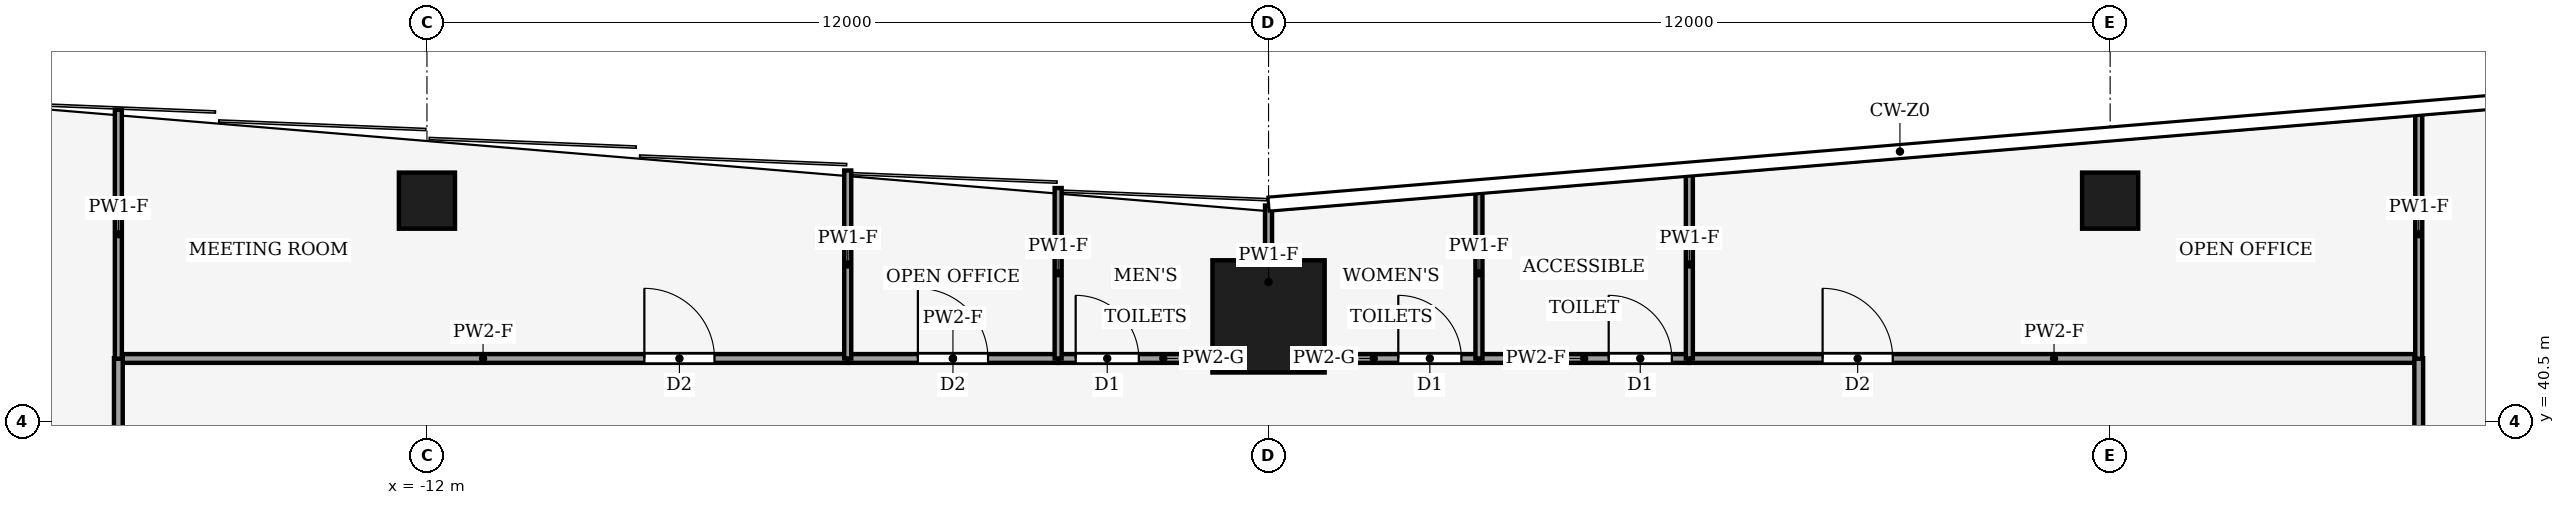
"""IFC4 building model, lengths in metres.
Left out: names, types, materials, properties, quantities, classifications, styles, units other than length and angle.
Written with IfcOpenShell. Run it as: python <this file> out.ifc"""

import sys

from ifc_helpers import new_model, si_unit, direction, frame, frame_2d, origin, origin_2d, place, context, subcontext, project, spatial, rectangle, hollow_rectangle, extrude, element, fill, save


model = new_model("IFC4")
c1 = context("Model", 3, precision=1e-05, world=origin(), true_north=direction((0.0, 1.0)))
c2 = subcontext(c1, "Body", "Model", "MODEL_VIEW")
j1 = project(units=[si_unit("LENGTHUNIT", "METRE"), si_unit("PLANEANGLEUNIT", "RADIAN")], contexts=[c1])
p1 = place(None, origin())
s1 = spatial("IfcSite", under=j1, at=p1, CompositionType="ELEMENT")
p2 = place(p1, origin())
s2 = spatial("IfcBuilding", under=s1, at=p2, CompositionType="ELEMENT")
p3 = place(p2, frame((0.0, 0.0, 42.0)))
s3 = spatial("IfcBuildingStorey", under=s2, at=p3, CompositionType="ELEMENT", Elevation=42.0)
p4 = place(p3, frame((0.0, 42.0, 0.0), z_axis=(0.0, 0.0, 1.0), x_axis=(1.0, 0.0, 0.0)))
e1 = element("IfcColumn", 1, at=p4, inside=s3, PredefinedType="COLUMN", context=c2, shape_type="SweptSolid", body=[
    extrude(hollow_rectangle(XDim=1.6, YDim=1.6, WallThickness=0.09, at=origin_2d()), origin(), (0.0, 0.0, 1.0), 4.0),
])
for number, where, z_axis, x_axis in (
    (2, (-12.0, 43.65, 0.0), (0.0, 0.0, 1.0), (1.0, 0.0, 0.0)),
    (3, (12.0, 43.65, 0.0), (0.0, 0.0, 1.0), (1.0, 0.0, 0.0)),
):
    element("IfcColumn", number, at=place(p3, frame(where, z_axis=z_axis, x_axis=x_axis)), inside=s3, PredefinedType="COLUMN", context=c2, shape_type="SweptSolid", body=[
        extrude(hollow_rectangle(XDim=0.8, YDim=0.8, WallThickness=0.04, at=origin_2d()), origin(), (0.0, 0.0, 1.0), 4.0),
    ])
p5 = place(p3, frame((-16.4, 41.4, 0.0), z_axis=(0.0, 0.0, 1.0), x_axis=(1.0, 0.0, 0.0)))
e4 = element("IfcWall", 4, at=p5, inside=s3, PredefinedType="PARTITIONING", context=c2, shape_type="SweptSolid", body=[
    extrude(rectangle(XDim=10.4, YDim=0.125, at=frame_2d((5.2, 0.0))), origin(), (0.0, 0.0, 1.0), 3.54),
])
p6 = place(p5, frame((7.5, 0.0, 0.0)))
e5 = element("IfcOpeningElement", 5, at=p6, cuts=e4, PredefinedType="OPENING", context=c2, shape_type="SweptSolid", body=[
    extrude(rectangle(XDim=1.0, YDim=2.1, at=frame_2d((0.5, 1.05))), frame((0.0, 0.073, 0.0), z_axis=(0.0, -1.0, 0.0), x_axis=(1.0, 0.0, 0.0)), (0.0, 0.0, 1.0), 0.145),
])
p7 = place(p3, frame((-6.0, 41.4, 0.0), z_axis=(0.0, 0.0, 1.0), x_axis=(1.0, 0.0, 0.0)))
e6 = element("IfcWall", 6, at=p7, inside=s3, PredefinedType="PARTITIONING", context=c2, shape_type="SweptSolid", body=[
    extrude(rectangle(XDim=3.0, YDim=0.125, at=frame_2d((1.5, 0.0))), origin(), (0.0, 0.0, 1.0), 3.54),
])
p8 = place(p7, frame((1.0, 0.0, 0.0)))
e7 = element("IfcOpeningElement", 7, at=p8, cuts=e6, PredefinedType="OPENING", context=c2, shape_type="SweptSolid", body=[
    extrude(rectangle(XDim=1.0, YDim=2.1, at=frame_2d((0.5, 1.05))), frame((0.0, 0.073, 0.0), z_axis=(0.0, -1.0, 0.0), x_axis=(1.0, 0.0, 0.0)), (0.0, 0.0, 1.0), 0.145),
])
p9 = place(p3, frame((-3.0, 41.4, 0.0), z_axis=(0.0, 0.0, 1.0), x_axis=(1.0, 0.0, 0.0)))
e8 = element("IfcWall", 8, at=p9, inside=s3, PredefinedType="PARTITIONING", context=c2, shape_type="SweptSolid", body=[
    extrude(rectangle(XDim=3.0, YDim=0.125, at=frame_2d((1.5, 0.0))), origin(), (0.0, 0.0, 1.0), 3.87),
])
p10 = place(p9, frame((0.25, 0.0, 0.0)))
e9 = element("IfcOpeningElement", 9, at=p10, cuts=e8, PredefinedType="OPENING", context=c2, shape_type="SweptSolid", body=[
    extrude(rectangle(XDim=0.9, YDim=2.1, at=frame_2d((0.45, 1.05))), frame((0.0, 0.073, 0.0), z_axis=(0.0, -1.0, 0.0), x_axis=(1.0, 0.0, 0.0)), (0.0, 0.0, 1.0), 0.145),
])
p11 = place(p3, frame((0.0, 41.4, 0.0), z_axis=(0.0, 0.0, 1.0), x_axis=(1.0, 0.0, 0.0)))
e10 = element("IfcWall", 10, at=p11, inside=s3, PredefinedType="PARTITIONING", context=c2, shape_type="SweptSolid", body=[
    extrude(rectangle(XDim=3.0, YDim=0.125, at=frame_2d((1.5, 0.0))), origin(), (0.0, 0.0, 1.0), 3.87),
])
p12 = place(p11, frame((1.85, 0.0, 0.0)))
e11 = element("IfcOpeningElement", 11, at=p12, cuts=e10, PredefinedType="OPENING", context=c2, shape_type="SweptSolid", body=[
    extrude(rectangle(XDim=0.9, YDim=2.1, at=frame_2d((0.45, 1.05))), frame((0.0, 0.073, 0.0), z_axis=(0.0, -1.0, 0.0), x_axis=(1.0, 0.0, 0.0)), (0.0, 0.0, 1.0), 0.145),
])
p13 = place(p3, frame((3.0, 41.4, 0.0), z_axis=(0.0, 0.0, 1.0), x_axis=(1.0, 0.0, 0.0)))
e12 = element("IfcWall", 12, at=p13, inside=s3, PredefinedType="PARTITIONING", context=c2, shape_type="SweptSolid", body=[
    extrude(rectangle(XDim=3.0, YDim=0.125, at=frame_2d((1.5, 0.0))), origin(), (0.0, 0.0, 1.0), 3.54),
])
p14 = place(p13, frame((1.85, 0.0, 0.0)))
e13 = element("IfcOpeningElement", 13, at=p14, cuts=e12, PredefinedType="OPENING", context=c2, shape_type="SweptSolid", body=[
    extrude(rectangle(XDim=0.9, YDim=2.1, at=frame_2d((0.45, 1.05))), frame((0.0, 0.073, 0.0), z_axis=(0.0, -1.0, 0.0), x_axis=(1.0, 0.0, 0.0)), (0.0, 0.0, 1.0), 0.145),
])
p15 = place(p3, frame((6.0, 41.4, 0.0), z_axis=(0.0, 0.0, 1.0), x_axis=(1.0, 0.0, 0.0)))
e14 = element("IfcWall", 14, at=p15, inside=s3, PredefinedType="PARTITIONING", context=c2, shape_type="SweptSolid", body=[
    extrude(rectangle(XDim=10.4, YDim=0.125, at=frame_2d((5.2, 0.0))), origin(), (0.0, 0.0, 1.0), 3.54),
])
p16 = place(p15, frame((1.9, 0.0, 0.0)))
e15 = element("IfcOpeningElement", 15, at=p16, cuts=e14, PredefinedType="OPENING", context=c2, shape_type="SweptSolid", body=[
    extrude(rectangle(XDim=1.0, YDim=2.1, at=frame_2d((0.5, 1.05))), frame((0.0, 0.073, 0.0), z_axis=(0.0, -1.0, 0.0), x_axis=(1.0, 0.0, 0.0)), (0.0, 0.0, 1.0), 0.145),
])
p17 = place(p3, frame((-16.4, 33.0, 0.0), z_axis=(0.0, 0.0, 1.0), x_axis=(0.0, 1.0, 0.0)))
e16 = element("IfcWall", 16, at=p17, inside=s3, PredefinedType="PARTITIONING", context=c2, shape_type="SweptSolid", body=[
    extrude(rectangle(XDim=8.404, YDim=0.125, at=frame_2d((4.202, 0.0))), origin(), (0.0, 0.0, 1.0), 3.14),
])
p18 = place(p17, frame((3.702, 0.0, 0.0)))
e17 = element("IfcOpeningElement", 17, at=p18, cuts=e16, PredefinedType="OPENING", context=c2, shape_type="SweptSolid", body=[
    extrude(rectangle(XDim=1.0, YDim=2.1, at=frame_2d((0.5, 1.05))), frame((0.0, 0.073, 0.0), z_axis=(0.0, -1.0, 0.0), x_axis=(1.0, 0.0, 0.0)), (0.0, 0.0, 1.0), 0.145),
])
p19 = place(p3, frame((16.4, 41.404, 0.0), z_axis=(0.0, 0.0, 1.0), x_axis=(0.0, -1.0, 0.0)))
e18 = element("IfcWall", 18, at=p19, inside=s3, PredefinedType="PARTITIONING", context=c2, shape_type="SweptSolid", body=[
    extrude(rectangle(XDim=8.404, YDim=0.125, at=frame_2d((4.202, 0.0))), origin(), (0.0, 0.0, 1.0), 3.14),
])
p20 = place(p19, frame((3.702, 0.0, 0.0)))
e19 = element("IfcOpeningElement", 19, at=p20, cuts=e18, PredefinedType="OPENING", context=c2, shape_type="SweptSolid", body=[
    extrude(rectangle(XDim=1.0, YDim=2.1, at=frame_2d((0.5, 1.05))), frame((0.0, 0.073, 0.0), z_axis=(0.0, -1.0, 0.0), x_axis=(1.0, 0.0, 0.0)), (0.0, 0.0, 1.0), 0.145),
])
p21 = place(p3, frame((-6.0, 41.4, 0.0), z_axis=(0.0, 0.0, 1.0), x_axis=(0.0, 1.0, 0.0)))
e20 = element("IfcWall", 20, at=p21, inside=s3, PredefinedType="PARTITIONING", context=c2, shape_type="SweptSolid", body=[
    extrude(rectangle(XDim=2.68, YDim=0.1, at=frame_2d((1.34, 0.0))), origin(), (0.0, 0.0, 1.0), 3.04),
])
p22 = place(p3, frame((-16.4, 44.947, 0.0), z_axis=(0.0, 0.0, 1.0), x_axis=(0.0, -1.0, 0.0)))
e21 = element("IfcWall", 21, at=p22, inside=s3, PredefinedType="PARTITIONING", context=c2, shape_type="SweptSolid", body=[
    extrude(rectangle(XDim=3.551, YDim=0.1, at=frame_2d((1.775, 0.0))), origin(), (0.0, 0.0, 1.0), 3.04),
])
p23 = place(p3, frame((-3.0, 41.4, 0.0), z_axis=(0.0, 0.0, 1.0), x_axis=(0.0, 1.0, 0.0)))
e22 = element("IfcWall", 22, at=p23, inside=s3, PredefinedType="PARTITIONING", context=c2, shape_type="SweptSolid", body=[
    extrude(rectangle(XDim=2.43, YDim=0.1, at=frame_2d((1.215, 0.0))), origin(), (0.0, 0.0, 1.0), 3.04),
])
p24 = place(p3, frame((0.0, 41.4, 0.0), z_axis=(0.0, 0.0, 1.0), x_axis=(0.0, 1.0, 0.0)))
e23 = element("IfcWall", 23, at=p24, inside=s3, PredefinedType="PARTITIONING", context=c2, shape_type="SweptSolid", body=[
    extrude(rectangle(XDim=2.18, YDim=0.1, at=frame_2d((1.09, 0.0))), origin(), (0.0, 0.0, 1.0), 3.04),
])
p25 = place(p3, frame((3.0, 41.4, 0.0), z_axis=(0.0, 0.0, 1.0), x_axis=(0.0, 1.0, 0.0)))
e24 = element("IfcWall", 24, at=p25, inside=s3, PredefinedType="PARTITIONING", context=c2, shape_type="SweptSolid", body=[
    extrude(rectangle(XDim=2.43, YDim=0.1, at=frame_2d((1.215, 0.0))), origin(), (0.0, 0.0, 1.0), 3.04),
])
p26 = place(p3, frame((6.0, 41.4, 0.0), z_axis=(0.0, 0.0, 1.0), x_axis=(0.0, 1.0, 0.0)))
e25 = element("IfcWall", 25, at=p26, inside=s3, PredefinedType="PARTITIONING", context=c2, shape_type="SweptSolid", body=[
    extrude(rectangle(XDim=2.68, YDim=0.1, at=frame_2d((1.34, 0.0))), origin(), (0.0, 0.0, 1.0), 3.04),
])
p27 = place(p3, frame((16.4, 41.396, 0.0), z_axis=(0.0, 0.0, 1.0), x_axis=(0.0, 1.0, 0.0)))
e26 = element("IfcWall", 26, at=p27, inside=s3, PredefinedType="PARTITIONING", context=c2, shape_type="SweptSolid", body=[
    extrude(rectangle(XDim=3.551, YDim=0.1, at=frame_2d((1.775, 0.0))), origin(), (0.0, 0.0, 1.0), 3.04),
])
p28 = place(p6, origin())
e27 = element("IfcDoor", 27, at=p28, inside=s3, OperationType="SINGLE_SWING_RIGHT", PredefinedType="DOOR", context=c2, shape_type="SweptSolid", body=[
    extrude(rectangle(XDim=1.0, YDim=2.1, at=frame_2d((0.5, 1.05))), frame((0.0, 0.025, 0.0), z_axis=(0.0, -1.0, 0.0), x_axis=(1.0, 0.0, 0.0)), (0.0, 0.0, 1.0), 0.05),
])
fill(e5, e27)
p29 = place(p8, origin())
e28 = element("IfcDoor", 28, at=p29, inside=s3, OperationType="SINGLE_SWING_RIGHT", PredefinedType="DOOR", context=c2, shape_type="SweptSolid", body=[
    extrude(rectangle(XDim=1.0, YDim=2.1, at=frame_2d((0.5, 1.05))), frame((0.0, 0.025, 0.0), z_axis=(0.0, -1.0, 0.0), x_axis=(1.0, 0.0, 0.0)), (0.0, 0.0, 1.0), 0.05),
])
fill(e7, e28)
p30 = place(p10, origin())
e29 = element("IfcDoor", 29, at=p30, inside=s3, OperationType="SINGLE_SWING_LEFT", PredefinedType="DOOR", context=c2, shape_type="SweptSolid", body=[
    extrude(rectangle(XDim=0.9, YDim=2.1, at=frame_2d((0.45, 1.05))), frame((0.0, 0.025, 0.0), z_axis=(0.0, -1.0, 0.0), x_axis=(1.0, 0.0, 0.0)), (0.0, 0.0, 1.0), 0.05),
])
fill(e9, e29)
p31 = place(p12, origin())
e30 = element("IfcDoor", 30, at=p31, inside=s3, OperationType="SINGLE_SWING_RIGHT", PredefinedType="DOOR", context=c2, shape_type="SweptSolid", body=[
    extrude(rectangle(XDim=0.9, YDim=2.1, at=frame_2d((0.45, 1.05))), frame((0.0, 0.025, 0.0), z_axis=(0.0, -1.0, 0.0), x_axis=(1.0, 0.0, 0.0)), (0.0, 0.0, 1.0), 0.05),
])
fill(e11, e30)
p32 = place(p14, origin())
e31 = element("IfcDoor", 31, at=p32, inside=s3, OperationType="SINGLE_SWING_RIGHT", PredefinedType="DOOR", context=c2, shape_type="SweptSolid", body=[
    extrude(rectangle(XDim=0.9, YDim=2.1, at=frame_2d((0.45, 1.05))), frame((0.0, 0.025, 0.0), z_axis=(0.0, -1.0, 0.0), x_axis=(1.0, 0.0, 0.0)), (0.0, 0.0, 1.0), 0.05),
])
fill(e13, e31)
p33 = place(p16, origin())
e32 = element("IfcDoor", 32, at=p33, inside=s3, OperationType="SINGLE_SWING_LEFT", PredefinedType="DOOR", context=c2, shape_type="SweptSolid", body=[
    extrude(rectangle(XDim=1.0, YDim=2.1, at=frame_2d((0.5, 1.05))), frame((0.0, 0.025, 0.0), z_axis=(0.0, -1.0, 0.0), x_axis=(1.0, 0.0, 0.0)), (0.0, 0.0, 1.0), 0.05),
])
fill(e15, e32)
save(model, sys.argv[1])
